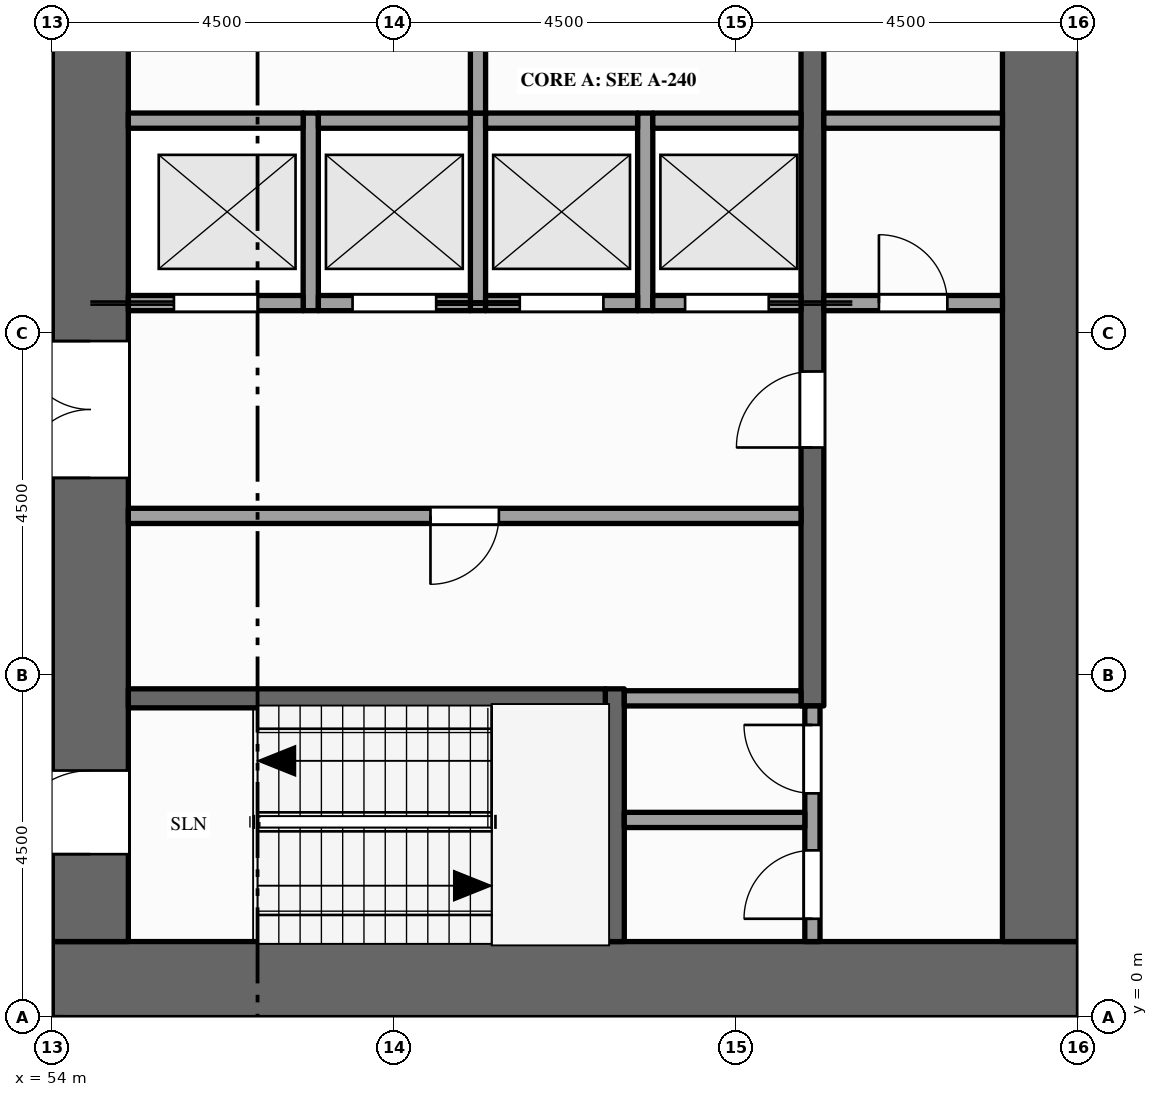
"""IFC4 building model, lengths in metres.
Left out: names, types, materials, properties, quantities, classifications, styles, units other than length and angle.
Written with IfcOpenShell. Run it as: python <this file> out.ifc"""

import sys

from ifc_helpers import new_model, si_unit, direction, frame, frame_2d, origin, place, context, subcontext, project, spatial, rectangle, extrude, element, fill, save


model = new_model("IFC4")
c1 = context("Model", 3, precision=1e-05, world=origin(), true_north=direction((0.0, 1.0)))
c2 = subcontext(c1, "Body", "Model", "MODEL_VIEW")
j1 = project(units=[si_unit("LENGTHUNIT", "METRE"), si_unit("PLANEANGLEUNIT", "RADIAN")], contexts=[c1])
p1 = place(None, origin())
s1 = spatial("IfcSite", under=j1, at=p1, CompositionType="ELEMENT")
p2 = place(p1, origin())
s2 = spatial("IfcBuilding", under=s1, at=p2, CompositionType="ELEMENT")
p3 = place(p2, frame((0.0, 0.0, 223.0)))
s3 = spatial("IfcBuildingStorey", under=s2, at=p3, CompositionType="ELEMENT", Elevation=223.0)
p4 = place(p3, frame((67.5, 0.5, -0.15), z_axis=(0.0, 0.0, 1.0), x_axis=(-1.0, 0.0, 0.0)))
e1 = element("IfcWall", 1, at=p4, inside=s3, PredefinedType="SHEAR", context=c2, shape_type="SweptSolid", body=[
    extrude(rectangle(XDim=13.5, YDim=1.0, at=frame_2d((6.75, 0.0))), origin(), (0.0, 0.0, 1.0), 4.0),
])
p5 = place(p3, frame((54.5, 1.0, -0.15), z_axis=(0.0, 0.0, 1.0), x_axis=(0.0, 1.0, 0.0)))
e2 = element("IfcWall", 2, at=p5, inside=s3, PredefinedType="SHEAR", context=c2, shape_type="SweptSolid", body=[
    extrude(rectangle(XDim=20.5, YDim=1.0, at=frame_2d((10.25, 0.0))), origin(), (0.0, 0.0, 1.0), 4.0),
])
p6 = place(p5, frame((6.1, 0.0, 0.15)))
e3 = element("IfcOpeningElement", 3, at=p6, cuts=e2, PredefinedType="OPENING", context=c2, shape_type="SweptSolid", body=[
    extrude(rectangle(XDim=1.8, YDim=2.1, at=frame_2d((0.9, 1.05))), frame((0.0, 0.51, 0.0), z_axis=(0.0, -1.0, 0.0), x_axis=(1.0, 0.0, 0.0)), (0.0, 0.0, 1.0), 1.02),
])
p7 = place(p5, frame((12.15, 0.0, 0.15)))
e4 = element("IfcOpeningElement", 4, at=p7, cuts=e2, PredefinedType="OPENING", context=c2, shape_type="SweptSolid", body=[
    extrude(rectangle(XDim=1.1, YDim=2.1, at=frame_2d((0.55, 1.05))), frame((0.0, 0.51, 0.0), z_axis=(0.0, -1.0, 0.0), x_axis=(1.0, 0.0, 0.0)), (0.0, 0.0, 1.0), 1.02),
])
p8 = place(p5, frame((1.15, 0.0, 0.15)))
e5 = element("IfcOpeningElement", 5, at=p8, cuts=e2, PredefinedType="OPENING", context=c2, shape_type="SweptSolid", body=[
    extrude(rectangle(XDim=1.1, YDim=2.1, at=frame_2d((0.55, 1.05))), frame((0.0, 0.51, 0.0), z_axis=(0.0, -1.0, 0.0), x_axis=(1.0, 0.0, 0.0)), (0.0, 0.0, 1.0), 1.02),
])
p9 = place(p5, frame((18.35, 0.0, 0.15)))
e6 = element("IfcOpeningElement", 6, at=p9, cuts=e2, PredefinedType="OPENING", context=c2, shape_type="SweptSolid", body=[
    extrude(rectangle(XDim=1.1, YDim=2.1, at=frame_2d((0.55, 1.05))), frame((0.0, 0.51, 0.0), z_axis=(0.0, -1.0, 0.0), x_axis=(1.0, 0.0, 0.0)), (0.0, 0.0, 1.0), 1.02),
])
p10 = place(p3, frame((67.0, 1.0, -0.15), z_axis=(0.0, 0.0, 1.0), x_axis=(0.0, 1.0, 0.0)))
e7 = element("IfcWall", 7, at=p10, inside=s3, PredefinedType="SHEAR", context=c2, shape_type="SweptSolid", body=[
    extrude(rectangle(XDim=20.5, YDim=1.0, at=frame_2d((10.25, 0.0))), origin(), (0.0, 0.0, 1.0), 4.0),
])
for number, where, z_axis, x_axis in (
    (8, (57.4, 9.3, 0.0), (0.0, 0.0, 1.0), (0.0, 1.0, 0.0)),
    (9, (59.6, 9.3, 0.0), (0.0, 0.0, 1.0), (0.0, 1.0, 0.0)),
):
    element("IfcWall", number, at=place(p3, frame(where, z_axis=z_axis, x_axis=x_axis)), inside=s3, PredefinedType="SOLIDWALL", context=c2, shape_type="SweptSolid", body=[
        extrude(rectangle(XDim=2.6, YDim=0.2, at=frame_2d((1.3, 0.0))), origin(), (0.0, 0.0, 1.0), 3.85),
    ])
p11 = place(p3, frame((59.6, 11.9, 0.0), z_axis=(0.0, 0.0, 1.0), x_axis=(0.0, 1.0, 0.0)))
e10 = element("IfcWall", 10, at=p11, inside=s3, PredefinedType="PARTITIONING", context=c2, shape_type="SweptSolid", body=[
    extrude(rectangle(XDim=3.6, YDim=0.2, at=frame_2d((1.8, 0.0))), origin(), (0.0, 0.0, 1.0), 3.85),
])
p12 = place(p11, frame((1.3, 0.0, 0.0)))
e11 = element("IfcOpeningElement", 11, at=p12, cuts=e10, PredefinedType="OPENING", context=c2, shape_type="SweptSolid", body=[
    extrude(rectangle(XDim=1.0, YDim=2.1, at=frame_2d((0.5, 1.05))), frame((0.0, 0.11, 0.0), z_axis=(0.0, -1.0, 0.0), x_axis=(1.0, 0.0, 0.0)), (0.0, 0.0, 1.0), 0.22),
])
p13 = place(p3, frame((61.4, 1.0, 0.0), z_axis=(0.0, 0.0, 1.0), x_axis=(0.0, 1.0, 0.0)))
e12 = element("IfcWall", 12, at=p13, inside=s3, PredefinedType="SHEAR", context=c2, shape_type="SweptSolid", body=[
    extrude(rectangle(XDim=3.325, YDim=0.25, at=frame_2d((1.663, 0.0))), origin(), (0.0, 0.0, 1.0), 3.85),
])
p14 = place(p3, frame((61.8, 9.3, 0.0), z_axis=(0.0, 0.0, 1.0), x_axis=(0.0, 1.0, 0.0)))
e13 = element("IfcWall", 13, at=p14, inside=s3, PredefinedType="SOLIDWALL", context=c2, shape_type="SweptSolid", body=[
    extrude(rectangle(XDim=2.6, YDim=0.2, at=frame_2d((1.3, 0.0))), origin(), (0.0, 0.0, 1.0), 3.85),
])
p15 = place(p3, frame((64.0, 1.0, 0.0), z_axis=(0.0, 0.0, 1.0), x_axis=(0.0, 1.0, 0.0)))
e14 = element("IfcWall", 14, at=p15, inside=s3, PredefinedType="PARTITIONING", context=c2, shape_type="SweptSolid", body=[
    extrude(rectangle(XDim=3.1, YDim=0.2, at=frame_2d((1.55, 0.0))), origin(), (0.0, 0.0, 1.0), 3.85),
])
p16 = place(p15, frame((0.3, 0.0, 0.0)))
e15 = element("IfcOpeningElement", 15, at=p16, cuts=e14, PredefinedType="OPENING", context=c2, shape_type="SweptSolid", body=[
    extrude(rectangle(XDim=0.9, YDim=2.1, at=frame_2d((0.45, 1.05))), frame((0.0, 0.11, 0.0), z_axis=(0.0, -1.0, 0.0), x_axis=(1.0, 0.0, 0.0)), (0.0, 0.0, 1.0), 0.22),
])
p17 = place(p15, frame((1.95, 0.0, 0.0)))
e16 = element("IfcOpeningElement", 16, at=p17, cuts=e14, PredefinedType="OPENING", context=c2, shape_type="SweptSolid", body=[
    extrude(rectangle(XDim=0.9, YDim=2.1, at=frame_2d((0.45, 1.05))), frame((0.0, 0.11, 0.0), z_axis=(0.0, -1.0, 0.0), x_axis=(1.0, 0.0, 0.0)), (0.0, 0.0, 1.0), 0.22),
])
p18 = place(p3, frame((64.0, 4.1, 0.0), z_axis=(0.0, 0.0, 1.0), x_axis=(0.0, 1.0, 0.0)))
e17 = element("IfcWall", 17, at=p18, inside=s3, PredefinedType="SHEAR", context=c2, shape_type="SweptSolid", body=[
    extrude(rectangle(XDim=14.5, YDim=0.3, at=frame_2d((7.25, 0.0))), origin(), (0.0, 0.0, 1.0), 3.85),
])
p19 = place(p18, frame((3.4, 0.0, 0.0)))
e18 = element("IfcOpeningElement", 18, at=p19, cuts=e17, PredefinedType="OPENING", context=c2, shape_type="SweptSolid", body=[
    extrude(rectangle(XDim=1.0, YDim=2.1, at=frame_2d((0.5, 1.05))), frame((0.0, 0.16, 0.0), z_axis=(0.0, -1.0, 0.0), x_axis=(1.0, 0.0, 0.0)), (0.0, 0.0, 1.0), 0.32),
])
p20 = place(p18, frame((9.1, 0.0, 0.0)))
e19 = element("IfcOpeningElement", 19, at=p20, cuts=e17, PredefinedType="OPENING", context=c2, shape_type="SweptSolid", body=[
    extrude(rectangle(XDim=1.0, YDim=2.1, at=frame_2d((0.5, 1.05))), frame((0.0, 0.16, 0.0), z_axis=(0.0, -1.0, 0.0), x_axis=(1.0, 0.0, 0.0)), (0.0, 0.0, 1.0), 0.32),
])
p21 = place(p3, frame((61.525, 2.6, 0.0), z_axis=(0.0, 0.0, 1.0), x_axis=(1.0, 0.0, 0.0)))
e20 = element("IfcWall", 20, at=p21, inside=s3, PredefinedType="PARTITIONING", context=c2, shape_type="SweptSolid", body=[
    extrude(rectangle(XDim=2.375, YDim=0.2, at=frame_2d((1.188, 0.0))), origin(), (0.0, 0.0, 1.0), 3.85),
])
p22 = place(p3, frame((55.0, 4.2, 0.0), z_axis=(0.0, 0.0, 1.0), x_axis=(1.0, 0.0, 0.0)))
e21 = element("IfcWall", 21, at=p22, inside=s3, PredefinedType="SHEAR", context=c2, shape_type="SweptSolid", body=[
    extrude(rectangle(XDim=6.275, YDim=0.25, at=frame_2d((3.137, 0.0))), origin(), (0.0, 0.0, 1.0), 3.85),
])
p23 = place(p3, frame((61.525, 4.2, 0.0), z_axis=(0.0, 0.0, 1.0), x_axis=(1.0, 0.0, 0.0)))
e22 = element("IfcWall", 22, at=p23, inside=s3, PredefinedType="PARTITIONING", context=c2, shape_type="SweptSolid", body=[
    extrude(rectangle(XDim=2.325, YDim=0.2, at=frame_2d((1.163, 0.0))), origin(), (0.0, 0.0, 1.0), 3.85),
])
p24 = place(p3, frame((55.0, 6.6, 0.0), z_axis=(0.0, 0.0, 1.0), x_axis=(1.0, 0.0, 0.0)))
e23 = element("IfcWall", 23, at=p24, inside=s3, PredefinedType="PARTITIONING", context=c2, shape_type="SweptSolid", body=[
    extrude(rectangle(XDim=8.85, YDim=0.2, at=frame_2d((4.425, 0.0))), origin(), (0.0, 0.0, 1.0), 3.85),
])
p25 = place(p24, frame((3.975, 0.0, 0.0)))
e24 = element("IfcOpeningElement", 24, at=p25, cuts=e23, PredefinedType="OPENING", context=c2, shape_type="SweptSolid", body=[
    extrude(rectangle(XDim=0.9, YDim=2.1, at=frame_2d((0.45, 1.05))), frame((0.0, 0.11, 0.0), z_axis=(0.0, -1.0, 0.0), x_axis=(1.0, 0.0, 0.0)), (0.0, 0.0, 1.0), 0.22),
])
p26 = place(p3, frame((55.0, 9.4, 0.0), z_axis=(0.0, 0.0, 1.0), x_axis=(1.0, 0.0, 0.0)))
e25 = element("IfcWall", 25, at=p26, inside=s3, PredefinedType="SOLIDWALL", context=c2, shape_type="SweptSolid", body=[
    extrude(rectangle(XDim=2.3, YDim=0.2, at=frame_2d((1.15, 0.0))), origin(), (0.0, 0.0, 1.0), 3.85),
])
p27 = place(p26, frame((0.6, 0.0, 0.012)))
e26 = element("IfcOpeningElement", 26, at=p27, cuts=e25, PredefinedType="OPENING", context=c2, shape_type="SweptSolid", body=[
    extrude(rectangle(XDim=1.1, YDim=2.1, at=frame_2d((0.55, 1.05))), frame((0.0, 0.11, 0.0), z_axis=(0.0, -1.0, 0.0), x_axis=(1.0, 0.0, 0.0)), (0.0, 0.0, 1.0), 0.22),
])
p28 = place(p3, frame((57.5, 9.4, 0.0), z_axis=(0.0, 0.0, 1.0), x_axis=(1.0, 0.0, 0.0)))
e27 = element("IfcWall", 27, at=p28, inside=s3, PredefinedType="SOLIDWALL", context=c2, shape_type="SweptSolid", body=[
    extrude(rectangle(XDim=2.0, YDim=0.2, at=frame_2d((1.0, 0.0))), origin(), (0.0, 0.0, 1.0), 3.85),
])
p29 = place(p28, frame((0.45, 0.0, 0.012)))
e28 = element("IfcOpeningElement", 28, at=p29, cuts=e27, PredefinedType="OPENING", context=c2, shape_type="SweptSolid", body=[
    extrude(rectangle(XDim=1.1, YDim=2.1, at=frame_2d((0.55, 1.05))), frame((0.0, 0.11, 0.0), z_axis=(0.0, -1.0, 0.0), x_axis=(1.0, 0.0, 0.0)), (0.0, 0.0, 1.0), 0.22),
])
p30 = place(p3, frame((59.7, 9.4, 0.0), z_axis=(0.0, 0.0, 1.0), x_axis=(1.0, 0.0, 0.0)))
e29 = element("IfcWall", 29, at=p30, inside=s3, PredefinedType="SOLIDWALL", context=c2, shape_type="SweptSolid", body=[
    extrude(rectangle(XDim=2.0, YDim=0.2, at=frame_2d((1.0, 0.0))), origin(), (0.0, 0.0, 1.0), 3.85),
])
p31 = place(p30, frame((0.45, 0.0, 0.012)))
e30 = element("IfcOpeningElement", 30, at=p31, cuts=e29, PredefinedType="OPENING", context=c2, shape_type="SweptSolid", body=[
    extrude(rectangle(XDim=1.1, YDim=2.1, at=frame_2d((0.55, 1.05))), frame((0.0, 0.11, 0.0), z_axis=(0.0, -1.0, 0.0), x_axis=(1.0, 0.0, 0.0)), (0.0, 0.0, 1.0), 0.22),
])
p32 = place(p3, frame((61.9, 9.4, 0.0), z_axis=(0.0, 0.0, 1.0), x_axis=(1.0, 0.0, 0.0)))
e31 = element("IfcWall", 31, at=p32, inside=s3, PredefinedType="SOLIDWALL", context=c2, shape_type="SweptSolid", body=[
    extrude(rectangle(XDim=1.95, YDim=0.2, at=frame_2d((0.975, 0.0))), origin(), (0.0, 0.0, 1.0), 3.85),
])
p33 = place(p32, frame((0.425, 0.0, 0.012)))
e32 = element("IfcOpeningElement", 32, at=p33, cuts=e31, PredefinedType="OPENING", context=c2, shape_type="SweptSolid", body=[
    extrude(rectangle(XDim=1.1, YDim=2.1, at=frame_2d((0.55, 1.05))), frame((0.0, 0.11, 0.0), z_axis=(0.0, -1.0, 0.0), x_axis=(1.0, 0.0, 0.0)), (0.0, 0.0, 1.0), 0.22),
])
p34 = place(p3, frame((64.15, 9.4, 0.0), z_axis=(0.0, 0.0, 1.0), x_axis=(1.0, 0.0, 0.0)))
e33 = element("IfcWall", 33, at=p34, inside=s3, PredefinedType="PARTITIONING", context=c2, shape_type="SweptSolid", body=[
    extrude(rectangle(XDim=2.35, YDim=0.2, at=frame_2d((1.175, 0.0))), origin(), (0.0, 0.0, 1.0), 3.85),
])
p35 = place(p34, frame((0.725, 0.0, 0.0)))
e34 = element("IfcOpeningElement", 34, at=p35, cuts=e33, PredefinedType="OPENING", context=c2, shape_type="SweptSolid", body=[
    extrude(rectangle(XDim=0.9, YDim=2.1, at=frame_2d((0.45, 1.05))), frame((0.0, 0.11, 0.0), z_axis=(0.0, -1.0, 0.0), x_axis=(1.0, 0.0, 0.0)), (0.0, 0.0, 1.0), 0.22),
])
p36 = place(p3, frame((55.0, 11.8, 0.0), z_axis=(0.0, 0.0, 1.0), x_axis=(1.0, 0.0, 0.0)))
e35 = element("IfcWall", 35, at=p36, inside=s3, PredefinedType="SOLIDWALL", context=c2, shape_type="SweptSolid", body=[
    extrude(rectangle(XDim=2.3, YDim=0.2, at=frame_2d((1.15, 0.0))), origin(), (0.0, 0.0, 1.0), 3.85),
])
for number, where, z_axis, x_axis in (
    (36, (57.5, 11.8, 0.0), (0.0, 0.0, 1.0), (1.0, 0.0, 0.0)),
    (37, (59.7, 11.8, 0.0), (0.0, 0.0, 1.0), (1.0, 0.0, 0.0)),
):
    element("IfcWall", number, at=place(p3, frame(where, z_axis=z_axis, x_axis=x_axis)), inside=s3, PredefinedType="SOLIDWALL", context=c2, shape_type="SweptSolid", body=[
        extrude(rectangle(XDim=2.0, YDim=0.2, at=frame_2d((1.0, 0.0))), origin(), (0.0, 0.0, 1.0), 3.85),
    ])
p37 = place(p3, frame((61.9, 11.8, 0.0), z_axis=(0.0, 0.0, 1.0), x_axis=(1.0, 0.0, 0.0)))
e38 = element("IfcWall", 38, at=p37, inside=s3, PredefinedType="SOLIDWALL", context=c2, shape_type="SweptSolid", body=[
    extrude(rectangle(XDim=1.95, YDim=0.2, at=frame_2d((0.975, 0.0))), origin(), (0.0, 0.0, 1.0), 3.85),
])
p38 = place(p3, frame((64.15, 11.8, 0.0), z_axis=(0.0, 0.0, 1.0), x_axis=(1.0, 0.0, 0.0)))
e39 = element("IfcWall", 39, at=p38, inside=s3, PredefinedType="PARTITIONING", context=c2, shape_type="SweptSolid", body=[
    extrude(rectangle(XDim=2.35, YDim=0.2, at=frame_2d((1.175, 0.0))), origin(), (0.0, 0.0, 1.0), 3.85),
])
p39 = place(p27, origin())
e40 = element("IfcDoor", 40, at=p39, inside=s3, OperationType="SLIDING_TO_LEFT", PredefinedType="DOOR", context=c2, shape_type="SweptSolid", body=[
    extrude(rectangle(XDim=1.1, YDim=2.1, at=frame_2d((0.55, 1.05))), frame((0.0, 0.025, 0.0), z_axis=(0.0, -1.0, 0.0), x_axis=(1.0, 0.0, 0.0)), (0.0, 0.0, 1.0), 0.05),
])
fill(e26, e40)
p40 = place(p29, origin())
e41 = element("IfcDoor", 41, at=p40, inside=s3, OperationType="SLIDING_TO_RIGHT", PredefinedType="DOOR", context=c2, shape_type="SweptSolid", body=[
    extrude(rectangle(XDim=1.1, YDim=2.1, at=frame_2d((0.55, 1.05))), frame((0.0, 0.025, 0.0), z_axis=(0.0, -1.0, 0.0), x_axis=(1.0, 0.0, 0.0)), (0.0, 0.0, 1.0), 0.05),
])
fill(e28, e41)
p41 = place(p31, origin())
e42 = element("IfcDoor", 42, at=p41, inside=s3, OperationType="SLIDING_TO_LEFT", PredefinedType="DOOR", context=c2, shape_type="SweptSolid", body=[
    extrude(rectangle(XDim=1.1, YDim=2.1, at=frame_2d((0.55, 1.05))), frame((0.0, 0.025, 0.0), z_axis=(0.0, -1.0, 0.0), x_axis=(1.0, 0.0, 0.0)), (0.0, 0.0, 1.0), 0.05),
])
fill(e30, e42)
p42 = place(p33, origin())
e43 = element("IfcDoor", 43, at=p42, inside=s3, OperationType="SLIDING_TO_RIGHT", PredefinedType="DOOR", context=c2, shape_type="SweptSolid", body=[
    extrude(rectangle(XDim=1.1, YDim=2.1, at=frame_2d((0.55, 1.05))), frame((0.0, 0.025, 0.0), z_axis=(0.0, -1.0, 0.0), x_axis=(1.0, 0.0, 0.0)), (0.0, 0.0, 1.0), 0.05),
])
fill(e32, e43)
p43 = place(p6, origin())
e44 = element("IfcDoor", 44, at=p43, inside=s3, OperationType="DOUBLE_DOOR_SINGLE_SWING", PredefinedType="DOOR", context=c2, shape_type="SweptSolid", body=[
    extrude(rectangle(XDim=1.8, YDim=2.1, at=frame_2d((0.9, 1.05))), frame((0.0, 0.025, 0.0), z_axis=(0.0, -1.0, 0.0), x_axis=(1.0, 0.0, 0.0)), (0.0, 0.0, 1.0), 0.05),
])
fill(e3, e44)
p44 = place(p19, origin())
e45 = element("IfcDoor", 45, at=p44, inside=s3, OperationType="SINGLE_SWING_LEFT", PredefinedType="DOOR", context=c2, shape_type="SweptSolid", body=[
    extrude(rectangle(XDim=1.0, YDim=2.1, at=frame_2d((0.5, 1.05))), frame((0.0, 0.025, 0.0), z_axis=(0.0, -1.0, 0.0), x_axis=(1.0, 0.0, 0.0)), (0.0, 0.0, 1.0), 0.05),
])
fill(e18, e45)
p45 = place(p35, origin())
e46 = element("IfcDoor", 46, at=p45, inside=s3, OperationType="SINGLE_SWING_LEFT", PredefinedType="DOOR", context=c2, shape_type="SweptSolid", body=[
    extrude(rectangle(XDim=0.9, YDim=2.1, at=frame_2d((0.45, 1.05))), frame((0.0, 0.025, 0.0), z_axis=(0.0, -1.0, 0.0), x_axis=(1.0, 0.0, 0.0)), (0.0, 0.0, 1.0), 0.05),
])
fill(e34, e46)
p46 = place(p8, origin())
e47 = element("IfcDoor", 47, at=p46, inside=s3, OperationType="SINGLE_SWING_LEFT", PredefinedType="DOOR", context=c2, shape_type="SweptSolid", body=[
    extrude(rectangle(XDim=1.1, YDim=2.1, at=frame_2d((0.55, 1.05))), frame((0.0, 0.025, 0.0), z_axis=(0.0, -1.0, 0.0), x_axis=(1.0, 0.0, 0.0)), (0.0, 0.0, 1.0), 0.05),
])
fill(e5, e47)
p47 = place(p16, origin())
e48 = element("IfcDoor", 48, at=p47, inside=s3, OperationType="SINGLE_SWING_LEFT", PredefinedType="DOOR", context=c2, shape_type="SweptSolid", body=[
    extrude(rectangle(XDim=0.9, YDim=2.1, at=frame_2d((0.45, 1.05))), frame((0.0, 0.025, 0.0), z_axis=(0.0, -1.0, 0.0), x_axis=(1.0, 0.0, 0.0)), (0.0, 0.0, 1.0), 0.05),
])
fill(e15, e48)
p48 = place(p17, origin())
e49 = element("IfcDoor", 49, at=p48, inside=s3, OperationType="SINGLE_SWING_RIGHT", PredefinedType="DOOR", context=c2, shape_type="SweptSolid", body=[
    extrude(rectangle(XDim=0.9, YDim=2.1, at=frame_2d((0.45, 1.05))), frame((0.0, 0.025, 0.0), z_axis=(0.0, -1.0, 0.0), x_axis=(1.0, 0.0, 0.0)), (0.0, 0.0, 1.0), 0.05),
])
fill(e16, e49)
p49 = place(p25, origin())
e50 = element("IfcDoor", 50, at=p49, inside=s3, OperationType="SINGLE_SWING_LEFT", PredefinedType="DOOR", context=c2, shape_type="SweptSolid", body=[
    extrude(rectangle(XDim=0.9, YDim=2.1, at=frame_2d((0.45, 1.05))), frame((0.0, 0.025, 0.0), z_axis=(0.0, -1.0, 0.0), x_axis=(1.0, 0.0, 0.0)), (0.0, 0.0, 1.0), 0.05),
])
fill(e24, e50)
save(model, sys.argv[1])
